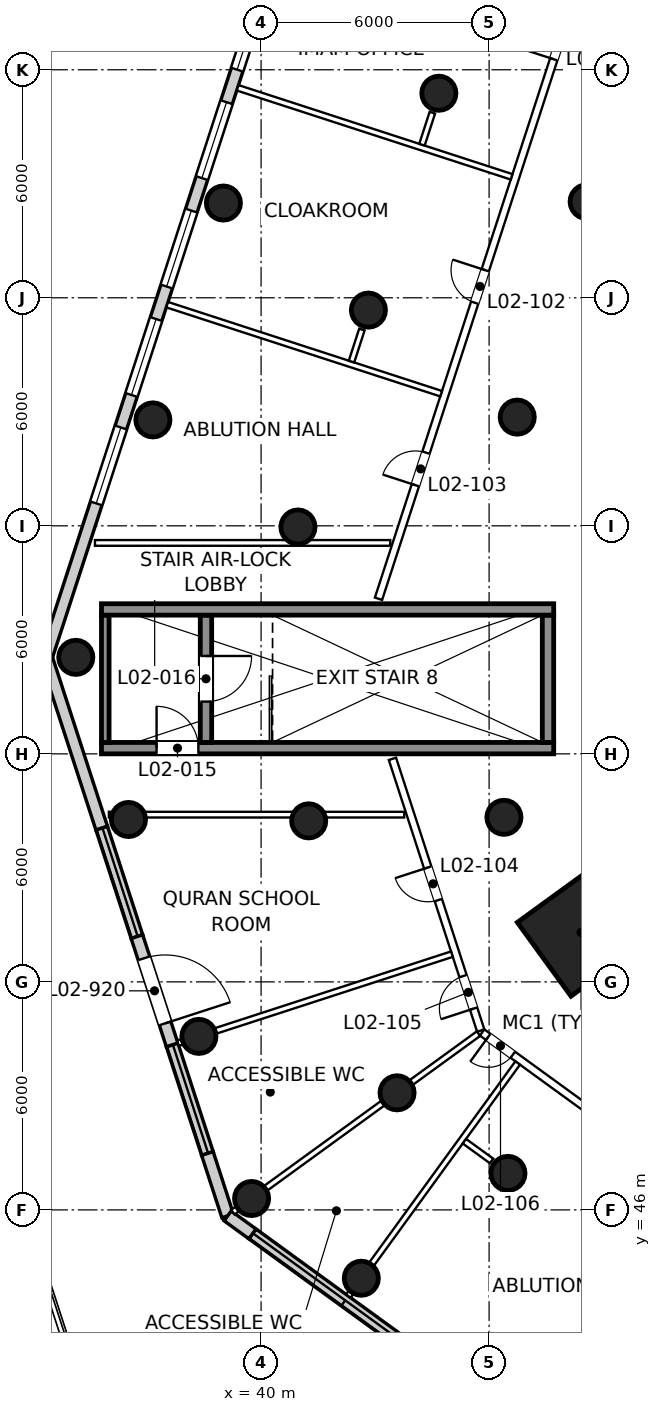
"""IFC4 building model, lengths in metres.
Left out: names, types, materials, properties, quantities, classifications, styles, units other than length and angle.
Written with IfcOpenShell. Run it as: python <this file> out.ifc"""

import sys

from ifc_helpers import new_model, si_unit, direction, frame, frame_2d, origin, origin_2d, place, context, subcontext, project, spatial, rectangle, circle, extrude, element, fill, save


model = new_model("IFC4")
c1 = context("Model", 3, precision=1e-05, world=origin(), true_north=direction((0.0, 1.0)))
c2 = subcontext(c1, "Body", "Model", "MODEL_VIEW")
j1 = project(units=[si_unit("LENGTHUNIT", "METRE"), si_unit("PLANEANGLEUNIT", "RADIAN")], contexts=[c1])
p1 = place(None, origin())
s1 = spatial("IfcSite", under=j1, at=p1, CompositionType="ELEMENT")
p2 = place(p1, origin())
s2 = spatial("IfcBuilding", under=s1, at=p2, CompositionType="ELEMENT")
p3 = place(p2, frame((0.0, 0.0, 15.0)))
s3 = spatial("IfcBuildingStorey", under=s2, at=p3, CompositionType="ELEMENT", Elevation=15.0)
p4 = place(p3, frame((46.39, 56.33, 0.0), z_axis=(0.0, 0.0, 1.0), x_axis=(1.0, 0.0, 0.0)))
e1 = element("IfcColumn", 1, at=p4, inside=s3, PredefinedType="COLUMN", context=c2, shape_type="SweptSolid", body=[
    extrude(circle(Radius=0.45, at=origin_2d()), origin(), (0.0, 0.0, 1.0), 8.0),
])
p5 = place(p3, frame((48.42, 53.3, 0.0), z_axis=(0.0, 0.0, 1.0), x_axis=(-0.809016994375, -0.587785252292, 0.0)))
e2 = element("IfcColumn", 2, at=p5, inside=s3, PredefinedType="COLUMN", context=c2, shape_type="SweptSolid", body=[
    extrude(rectangle(XDim=2.4, YDim=2.4, at=origin_2d()), origin(), (0.0, 0.0, 1.0), 8.0),
])
for number, where, z_axis, x_axis in (
    (3, (48.58, 72.53, 0.0), (0.0, 0.0, 1.0), (1.0, 0.0, 0.0)),
    (4, (46.74, 66.86, 0.0), (0.0, 0.0, 1.0), (1.0, 0.0, 0.0)),
    (5, (35.124, 60.539, 0.0), (0.0, 0.0, 1.0), (1.0, 0.0, 0.0)),
    (6, (36.51, 56.273, 0.0), (0.0, 0.0, 1.0), (1.0, 0.0, 0.0)),
    (7, (38.364, 50.566, 0.0), (0.0, 0.0, 1.0), (1.0, 0.0, 0.0)),
    (8, (39.75, 46.3, 0.0), (0.0, 0.0, 1.0), (1.0, 0.0, 0.0)),
    (9, (42.637, 44.202, 0.0), (0.0, 0.0, 1.0), (1.0, 0.0, 0.0)),
    (10, (39.008, 72.493, 0.0), (0.0, 0.0, 1.0), (1.0, 0.0, 0.0)),
    (11, (37.153, 66.787, 0.0), (0.0, 0.0, 1.0), (1.0, 0.0, 0.0)),
    (12, (41.253, 56.237, 0.0), (0.0, 0.0, 1.0), (1.0, 0.0, 0.0)),
    (13, (43.578, 49.081, 0.0), (0.0, 0.0, 1.0), (1.0, 0.0, 0.0)),
    (14, (46.496, 46.961, 0.0), (0.0, 0.0, 1.0), (1.0, 0.0, 0.0)),
    (15, (44.678, 75.382, 0.0), (0.0, 0.0, 1.0), (1.0, 0.0, 0.0)),
    (16, (42.824, 69.676, 0.0), (0.0, 0.0, 1.0), (1.0, 0.0, 0.0)),
    (17, (40.97, 63.969, 0.0), (0.0, 0.0, 1.0), (1.0, 0.0, 0.0)),
):
    element("IfcColumn", number, at=place(p3, frame(where, z_axis=z_axis, x_axis=x_axis)), inside=s3, PredefinedType="COLUMN", context=c2, shape_type="SweptSolid", body=[
        extrude(circle(Radius=0.45, at=origin_2d()), origin(), (0.0, 0.0, 1.0), 8.0),
    ])
p6 = place(p3, frame((34.345, 60.539, 0.0), z_axis=(0.0, 0.0, 1.0), x_axis=(0.309012484204, -0.951057981727, 0.0)))
e18 = element("IfcWall", 18, at=p6, inside=s3, PredefinedType="SOLIDWALL", context=c2, shape_type="SweptSolid", body=[
    extrude(rectangle(XDim=4.726, YDim=0.32, at=frame_2d((2.363, 0.0))), origin(), (0.0, 0.0, 1.0), 7.65),
])
p7 = place(p3, frame((35.806, 56.044, 0.0), z_axis=(0.0, 0.0, 1.0), x_axis=(0.309065831784, -0.951040646673, 0.0)))
e19 = element("IfcWall", 19, at=p7, inside=s3, PredefinedType="SOLIDWALL", context=c2, shape_type="SweptSolid", body=[
    extrude(rectangle(XDim=3.0, YDim=0.32, at=frame_2d((1.5, 0.0))), origin(), (0.0, 0.0, 1.0), 2.5),
])
p8 = place(p3, frame((36.733, 53.191, 0.0), z_axis=(0.0, 0.0, 1.0), x_axis=(0.308992226232, -0.951064563596, 0.0)))
e20 = element("IfcWall", 20, at=p8, inside=s3, PredefinedType="SOLIDWALL", context=c2, shape_type="SweptSolid", body=[
    extrude(rectangle(XDim=3.0, YDim=0.32, at=frame_2d((1.5, 0.0))), origin(), (0.0, 0.0, 1.0), 7.65),
])
p9 = place(p8, frame((0.6, 0.0, 0.0)))
e21 = element("IfcOpeningElement", 21, at=p9, cuts=e20, PredefinedType="OPENING", context=c2, shape_type="SweptSolid", body=[
    extrude(rectangle(XDim=1.8, YDim=2.4, at=frame_2d((0.9, 1.2))), frame((0.0, 0.17, 0.0), z_axis=(0.0, -1.0, 0.0), x_axis=(1.0, 0.0, 0.0)), (0.0, 0.0, 1.0), 0.34),
])
p10 = place(p3, frame((37.66, 50.338, 0.0), z_axis=(0.0, 0.0, 1.0), x_axis=(0.309016142662, -0.951056793033, 0.0)))
e22 = element("IfcWall", 22, at=p10, inside=s3, PredefinedType="SOLIDWALL", context=c2, shape_type="SweptSolid", body=[
    extrude(rectangle(XDim=3.0, YDim=0.32, at=frame_2d((1.5, 0.0))), origin(), (0.0, 0.0, 1.0), 2.5),
])
p11 = place(p3, frame((38.587, 47.485, 0.0), z_axis=(0.0, 0.0, 1.0), x_axis=(0.309006126888, -0.951060047287, 0.0)))
e23 = element("IfcWall", 23, at=p11, inside=s3, PredefinedType="SOLIDWALL", context=c2, shape_type="SweptSolid", body=[
    extrude(rectangle(XDim=1.726, YDim=0.32, at=frame_2d((0.863, 0.0))), origin(), (0.0, 0.0, 1.0), 7.65),
])
p12 = place(p3, frame((39.121, 45.843, 0.0), z_axis=(0.0, 0.0, 1.0), x_axis=(0.808957761835, -0.587866770252, 0.0)))
e24 = element("IfcWall", 24, at=p12, inside=s3, PredefinedType="SOLIDWALL", context=c2, shape_type="SweptSolid", body=[
    extrude(rectangle(XDim=0.809, YDim=0.32, at=frame_2d((0.405, 0.0))), origin(), (0.0, 0.0, 1.0), 7.65),
])
p13 = place(p3, frame((39.775, 45.367, 0.0), z_axis=(0.0, 0.0, 1.0), x_axis=(0.809016642472, -0.587785736645, 0.0)))
e25 = element("IfcWall", 25, at=p13, inside=s3, PredefinedType="SOLIDWALL", context=c2, shape_type="SweptSolid", body=[
    extrude(rectangle(XDim=12.0, YDim=0.32, at=frame_2d((6.0, 0.0))), origin(), (0.0, 0.0, 1.0), 2.5),
])
p14 = place(p3, frame((42.288, 84.985, 0.0), z_axis=(0.0, 0.0, 1.0), x_axis=(-0.309017988697, -0.95105619322, 0.0)))
e26 = element("IfcWall", 26, at=p14, inside=s3, PredefinedType="SOLIDWALL", context=c2, shape_type="SweptSolid", body=[
    extrude(rectangle(XDim=25.704, YDim=0.32, at=frame_2d((12.852, 0.0))), origin(), (0.0, 0.0, 1.0), 7.65),
])
p15 = place(p14, frame((7.344, 0.0, 0.9)))
e27 = element("IfcOpeningElement", 27, at=p15, cuts=e26, PredefinedType="OPENING", context=c2, shape_type="SweptSolid", body=[
    extrude(rectangle(XDim=2.1, YDim=3.0, at=frame_2d((1.05, 1.5))), frame((0.0, 0.17, 0.0), z_axis=(0.0, -1.0, 0.0), x_axis=(1.0, 0.0, 0.0)), (0.0, 0.0, 1.0), 0.34),
])
p16 = place(p14, frame((10.344, 0.0, 0.9)))
e28 = element("IfcOpeningElement", 28, at=p16, cuts=e26, PredefinedType="OPENING", context=c2, shape_type="SweptSolid", body=[
    extrude(rectangle(XDim=2.1, YDim=3.0, at=frame_2d((1.05, 1.5))), frame((0.0, 0.17, 0.0), z_axis=(0.0, -1.0, 0.0), x_axis=(1.0, 0.0, 0.0)), (0.0, 0.0, 1.0), 0.34),
])
p17 = place(p14, frame((13.344, 0.0, 0.9)))
e29 = element("IfcOpeningElement", 29, at=p17, cuts=e26, PredefinedType="OPENING", context=c2, shape_type="SweptSolid", body=[
    extrude(rectangle(XDim=2.1, YDim=3.0, at=frame_2d((1.05, 1.5))), frame((0.0, 0.17, 0.0), z_axis=(0.0, -1.0, 0.0), x_axis=(1.0, 0.0, 0.0)), (0.0, 0.0, 1.0), 0.34),
])
p18 = place(p14, frame((16.344, 0.0, 0.9)))
e30 = element("IfcOpeningElement", 30, at=p18, cuts=e26, PredefinedType="OPENING", context=c2, shape_type="SweptSolid", body=[
    extrude(rectangle(XDim=2.1, YDim=3.0, at=frame_2d((1.05, 1.5))), frame((0.0, 0.17, 0.0), z_axis=(0.0, -1.0, 0.0), x_axis=(1.0, 0.0, 0.0)), (0.0, 0.0, 1.0), 0.34),
])
p19 = place(p14, frame((19.344, 0.0, 0.9)))
e31 = element("IfcOpeningElement", 31, at=p19, cuts=e26, PredefinedType="OPENING", context=c2, shape_type="SweptSolid", body=[
    extrude(rectangle(XDim=2.1, YDim=3.0, at=frame_2d((1.05, 1.5))), frame((0.0, 0.17, 0.0), z_axis=(0.0, -1.0, 0.0), x_axis=(1.0, 0.0, 0.0)), (0.0, 0.0, 1.0), 0.34),
])
p20 = place(p3, frame((35.8, 58.15, 0.0), z_axis=(0.0, 0.0, 1.0), x_axis=(1.0, 0.0, 0.0)))
e32 = element("IfcWall", 32, at=p20, inside=s3, PredefinedType="SHEAR", context=c2, shape_type="SweptSolid", body=[
    extrude(rectangle(XDim=11.9, YDim=0.3, at=frame_2d((5.95, 0.0))), origin(), (0.0, 0.0, 1.0), 8.0),
])
p21 = place(p20, frame((1.45, 0.0, 0.0)))
e33 = element("IfcOpeningElement", 33, at=p21, cuts=e32, PredefinedType="OPENING", context=c2, shape_type="SweptSolid", body=[
    extrude(rectangle(XDim=1.1, YDim=2.1, at=frame_2d((0.55, 1.05))), frame((0.0, 0.16, 0.0), z_axis=(0.0, -1.0, 0.0), x_axis=(1.0, 0.0, 0.0)), (0.0, 0.0, 1.0), 0.32),
])
p22 = place(p3, frame((35.9, 58.3, 0.0), z_axis=(0.0, 0.0, 1.0), x_axis=(0.0, 1.0, 0.0)))
e34 = element("IfcWall", 34, at=p22, inside=s3, PredefinedType="SHEAR", context=c2, shape_type="SweptSolid", body=[
    extrude(rectangle(XDim=3.35, YDim=0.2, at=frame_2d((1.675, 0.0))), origin(), (0.0, 0.0, 1.0), 8.0),
])
p23 = place(p3, frame((38.55, 58.3, 0.0), z_axis=(0.0, 0.0, 1.0), x_axis=(0.0, 1.0, 0.0)))
e35 = element("IfcWall", 35, at=p23, inside=s3, PredefinedType="SHEAR", context=c2, shape_type="SweptSolid", body=[
    extrude(rectangle(XDim=3.35, YDim=0.3, at=frame_2d((1.675, 0.0))), origin(), (0.0, 0.0, 1.0), 8.0),
])
p24 = place(p23, frame((1.075, 0.0, 0.0)))
e36 = element("IfcOpeningElement", 36, at=p24, cuts=e35, PredefinedType="OPENING", context=c2, shape_type="SweptSolid", body=[
    extrude(rectangle(XDim=1.2, YDim=2.1, at=frame_2d((0.6, 1.05))), frame((0.0, 0.16, 0.0), z_axis=(0.0, -1.0, 0.0), x_axis=(1.0, 0.0, 0.0)), (0.0, 0.0, 1.0), 0.32),
])
p25 = place(p3, frame((47.55, 58.3, 0.0), z_axis=(0.0, 0.0, 1.0), x_axis=(0.0, 1.0, 0.0)))
e37 = element("IfcWall", 37, at=p25, inside=s3, PredefinedType="SHEAR", context=c2, shape_type="SweptSolid", body=[
    extrude(rectangle(XDim=3.35, YDim=0.3, at=frame_2d((1.675, 0.0))), origin(), (0.0, 0.0, 1.0), 8.0),
])
p26 = place(p3, frame((35.8, 61.8, 0.0), z_axis=(0.0, 0.0, 1.0), x_axis=(1.0, 0.0, 0.0)))
e38 = element("IfcWall", 38, at=p26, inside=s3, PredefinedType="SHEAR", context=c2, shape_type="SweptSolid", body=[
    extrude(rectangle(XDim=11.9, YDim=0.3, at=frame_2d((5.95, 0.0))), origin(), (0.0, 0.0, 1.0), 8.0),
])
p27 = place(p3, frame((54.841, 44.112, 0.0), z_axis=(0.0, 0.0, 1.0), x_axis=(-0.809025571226, 0.587773447089, 0.0)))
e39 = element("IfcWall", 39, at=p27, inside=s3, PredefinedType="PARTITIONING", context=c2, shape_type="SweptSolid", body=[
    extrude(rectangle(XDim=11.156, YDim=0.2, at=frame_2d((5.578, 0.0))), origin(), (0.0, 0.0, 1.0), 7.65),
])
p28 = place(p27, frame((10.157, 0.0, 0.0)))
e40 = element("IfcOpeningElement", 40, at=p28, cuts=e39, PredefinedType="OPENING", context=c2, shape_type="SweptSolid", body=[
    extrude(rectangle(XDim=0.8, YDim=2.1, at=frame_2d((0.4, 1.05))), frame((0.0, 0.11, 0.0), z_axis=(0.0, -1.0, 0.0), x_axis=(1.0, 0.0, 0.0)), (0.0, 0.0, 1.0), 0.22),
])
p29 = place(p27, frame((5.404, 0.0, 0.0)))
e41 = element("IfcOpeningElement", 41, at=p29, cuts=e39, PredefinedType="OPENING", context=c2, shape_type="SweptSolid", body=[
    extrude(rectangle(XDim=0.9, YDim=2.1, at=frame_2d((0.45, 1.05))), frame((0.0, 0.11, 0.0), z_axis=(0.0, -1.0, 0.0), x_axis=(1.0, 0.0, 0.0)), (0.0, 0.0, 1.0), 0.22),
])
p30 = place(p3, frame((45.78, 50.719, 0.0), z_axis=(0.0, 0.0, 1.0), x_axis=(-0.309019251854, 0.951055782793, 0.0)))
e42 = element("IfcWall", 42, at=p30, inside=s3, PredefinedType="PARTITIONING", context=c2, shape_type="SweptSolid", body=[
    extrude(rectangle(XDim=7.518, YDim=0.2, at=frame_2d((3.759, 0.0))), origin(), (0.0, 0.0, 1.0), 7.65),
])
p31 = place(p30, frame((3.61, 0.0, 0.0)))
e43 = element("IfcOpeningElement", 43, at=p31, cuts=e42, PredefinedType="OPENING", context=c2, shape_type="SweptSolid", body=[
    extrude(rectangle(XDim=0.9, YDim=2.1, at=frame_2d((0.45, 1.05))), frame((0.0, 0.11, 0.0), z_axis=(0.0, -1.0, 0.0), x_axis=(1.0, 0.0, 0.0)), (0.0, 0.0, 1.0), 0.22),
])
p32 = place(p30, frame((0.607, 0.0, 0.0)))
e44 = element("IfcOpeningElement", 44, at=p32, cuts=e42, PredefinedType="OPENING", context=c2, shape_type="SweptSolid", body=[
    extrude(rectangle(XDim=0.9, YDim=2.1, at=frame_2d((0.45, 1.05))), frame((0.0, 0.11, 0.0), z_axis=(0.0, -1.0, 0.0), x_axis=(1.0, 0.0, 0.0)), (0.0, 0.0, 1.0), 0.22),
])
p33 = place(p3, frame((43.09, 62.081, 0.0), z_axis=(0.0, 0.0, 1.0), x_axis=(0.309014892187, 0.951057199335, 0.0)))
e45 = element("IfcWall", 45, at=p33, inside=s3, PredefinedType="PARTITIONING", context=c2, shape_type="SweptSolid", body=[
    extrude(rectangle(XDim=18.769, YDim=0.2, at=frame_2d((9.384, 0.0))), origin(), (0.0, 0.0, 1.0), 7.65),
])
p34 = place(p33, frame((14.926, 0.0, 0.0)))
e46 = element("IfcOpeningElement", 46, at=p34, cuts=e45, PredefinedType="OPENING", context=c2, shape_type="SweptSolid", body=[
    extrude(rectangle(XDim=0.9, YDim=2.1, at=frame_2d((0.45, 1.05))), frame((0.0, 0.11, 0.0), z_axis=(0.0, -1.0, 0.0), x_axis=(1.0, 0.0, 0.0)), (0.0, 0.0, 1.0), 0.22),
])
p35 = place(p33, frame((8.191, 0.0, 0.0)))
e47 = element("IfcOpeningElement", 47, at=p35, cuts=e45, PredefinedType="OPENING", context=c2, shape_type="SweptSolid", body=[
    extrude(rectangle(XDim=0.9, YDim=2.1, at=frame_2d((0.45, 1.05))), frame((0.0, 0.11, 0.0), z_axis=(0.0, -1.0, 0.0), x_axis=(1.0, 0.0, 0.0)), (0.0, 0.0, 1.0), 0.22),
])
p36 = place(p33, frame((3.143, 0.0, 0.0)))
e48 = element("IfcOpeningElement", 48, at=p36, cuts=e45, PredefinedType="OPENING", context=c2, shape_type="SweptSolid", body=[
    extrude(rectangle(XDim=0.9, YDim=2.1, at=frame_2d((0.45, 1.05))), frame((0.0, 0.11, 0.0), z_axis=(0.0, -1.0, 0.0), x_axis=(1.0, 0.0, 0.0)), (0.0, 0.0, 1.0), 0.22),
])
p37 = place(p3, frame((39.257, 45.942, 0.0), z_axis=(0.0, 0.0, 1.0), x_axis=(0.80901214883, 0.587791921556, 0.0)))
e49 = element("IfcWall", 49, at=p37, inside=s3, PredefinedType="PARTITIONING", context=c2, shape_type="SweptSolid", body=[
    extrude(rectangle(XDim=7.99, YDim=0.15, at=frame_2d((3.995, 0.0))), origin(), (0.0, 0.0, 1.0), 7.65),
])
for number, where, z_axis, x_axis in (
    (50, (39.383, 75.525, 0.0), (0.0, 0.0, 1.0), (0.951, -0.309, 0.0)),
    (51, (37.529, 69.819, 0.0), (0.0, 0.0, 1.0), (0.951, -0.309, 0.0)),
    (52, (37.812, 50.387, 0.0), (0.0, 0.0, 1.0), (0.951, 0.309, 0.0)),
    (53, (42.296, 43.733, 0.0), (0.0, 0.0, 1.0), (0.588, 0.809, 0.0)),
):
    element("IfcWall", number, at=place(p3, frame(where, z_axis=z_axis, x_axis=x_axis)), inside=s3, PredefinedType="PARTITIONING", context=c2, shape_type="SweptSolid", body=[
        extrude(rectangle(XDim=7.58, YDim=0.15, at=frame_2d((3.79, 0.0))), origin(), (0.0, 0.0, 1.0), 6.95),
    ])
p38 = place(p3, frame((46.066, 47.288, 0.0), z_axis=(0.0, 0.0, 1.0), x_axis=(-0.809105603792, 0.587663272557, 0.0)))
e54 = element("IfcWall", 54, at=p38, inside=s3, PredefinedType="PARTITIONING", context=c2, shape_type="SweptSolid", body=[
    extrude(rectangle(XDim=0.885, YDim=0.15, at=frame_2d((0.443, 0.0))), origin(), (0.0, 0.0, 1.0), 6.95),
])
p39 = place(p3, frame((44.507, 74.87, 0.0), z_axis=(0.0, 0.0, 1.0), x_axis=(-0.308936377944, -0.951082706384, 0.0)))
e55 = element("IfcWall", 55, at=p39, inside=s3, PredefinedType="PARTITIONING", context=c2, shape_type="SweptSolid", body=[
    extrude(rectangle(XDim=0.885, YDim=0.15, at=frame_2d((0.442, 0.0))), origin(), (0.0, 0.0, 1.0), 6.95),
])
p40 = place(p3, frame((42.653, 69.164, 0.0), z_axis=(0.0, 0.0, 1.0), x_axis=(-0.309104777097, -0.951027989481, 0.0)))
e56 = element("IfcWall", 56, at=p40, inside=s3, PredefinedType="PARTITIONING", context=c2, shape_type="SweptSolid", body=[
    extrude(rectangle(XDim=0.885, YDim=0.15, at=frame_2d((0.443, 0.0))), origin(), (0.0, 0.0, 1.0), 6.95),
])
p41 = place(p3, frame((35.995, 56.4, 0.0), z_axis=(0.0, 0.0, 1.0), x_axis=(1.0, 0.0, 0.0)))
e57 = element("IfcWall", 57, at=p41, inside=s3, PredefinedType="PARTITIONING", context=c2, shape_type="SweptSolid", body=[
    extrude(rectangle(XDim=7.77, YDim=0.15, at=frame_2d((3.885, 0.0))), origin(), (0.0, 0.0, 1.0), 7.65),
])
p42 = place(p3, frame((43.399, 63.55, 0.0), z_axis=(0.0, 0.0, 1.0), x_axis=(-1.0, 0.0, 0.0)))
e58 = element("IfcWall", 58, at=p42, inside=s3, PredefinedType="PARTITIONING", context=c2, shape_type="SweptSolid", body=[
    extrude(rectangle(XDim=7.77, YDim=0.15, at=frame_2d((3.885, 0.0))), origin(), (0.0, 0.0, 1.0), 6.95),
])
p43 = place(p9, origin())
e59 = element("IfcDoor", 59, at=p43, inside=s3, OperationType="DOUBLE_DOOR_DOUBLE_SWING", PredefinedType="DOOR", context=c2, shape_type="SweptSolid", body=[
    extrude(rectangle(XDim=1.8, YDim=2.4, at=frame_2d((0.9, 1.2))), frame((0.0, 0.04, 0.0), z_axis=(0.0, -1.0, 0.0), x_axis=(1.0, 0.0, 0.0)), (0.0, 0.0, 1.0), 0.05),
])
fill(e21, e59)
p44 = place(p15, origin())
e60 = element("IfcWindow", 60, at=p44, inside=s3, PartitioningType="SINGLE_PANEL", PredefinedType="WINDOW", context=c2, shape_type="SweptSolid", body=[
    extrude(rectangle(XDim=2.1, YDim=3.0, at=frame_2d((1.05, 1.5))), frame((0.0, 0.07, 0.0), z_axis=(0.0, -1.0, 0.0), x_axis=(1.0, 0.0, 0.0)), (0.0, 0.0, 1.0), 0.06),
])
fill(e27, e60)
p45 = place(p16, origin())
e61 = element("IfcWindow", 61, at=p45, inside=s3, PartitioningType="SINGLE_PANEL", PredefinedType="WINDOW", context=c2, shape_type="SweptSolid", body=[
    extrude(rectangle(XDim=2.1, YDim=3.0, at=frame_2d((1.05, 1.5))), frame((0.0, 0.07, 0.0), z_axis=(0.0, -1.0, 0.0), x_axis=(1.0, 0.0, 0.0)), (0.0, 0.0, 1.0), 0.06),
])
fill(e28, e61)
p46 = place(p17, origin())
e62 = element("IfcWindow", 62, at=p46, inside=s3, PartitioningType="SINGLE_PANEL", PredefinedType="WINDOW", context=c2, shape_type="SweptSolid", body=[
    extrude(rectangle(XDim=2.1, YDim=3.0, at=frame_2d((1.05, 1.5))), frame((0.0, 0.07, 0.0), z_axis=(0.0, -1.0, 0.0), x_axis=(1.0, 0.0, 0.0)), (0.0, 0.0, 1.0), 0.06),
])
fill(e29, e62)
p47 = place(p18, origin())
e63 = element("IfcWindow", 63, at=p47, inside=s3, PartitioningType="SINGLE_PANEL", PredefinedType="WINDOW", context=c2, shape_type="SweptSolid", body=[
    extrude(rectangle(XDim=2.1, YDim=3.0, at=frame_2d((1.05, 1.5))), frame((0.0, 0.07, 0.0), z_axis=(0.0, -1.0, 0.0), x_axis=(1.0, 0.0, 0.0)), (0.0, 0.0, 1.0), 0.06),
])
fill(e30, e63)
p48 = place(p19, origin())
e64 = element("IfcWindow", 64, at=p48, inside=s3, PartitioningType="SINGLE_PANEL", PredefinedType="WINDOW", context=c2, shape_type="SweptSolid", body=[
    extrude(rectangle(XDim=2.1, YDim=3.0, at=frame_2d((1.05, 1.5))), frame((0.0, 0.07, 0.0), z_axis=(0.0, -1.0, 0.0), x_axis=(1.0, 0.0, 0.0)), (0.0, 0.0, 1.0), 0.06),
])
fill(e31, e64)
p49 = place(p21, origin())
e65 = element("IfcDoor", 65, at=p49, inside=s3, OperationType="SINGLE_SWING_LEFT", PredefinedType="DOOR", context=c2, shape_type="SweptSolid", body=[
    extrude(rectangle(XDim=1.1, YDim=2.1, at=frame_2d((0.55, 1.05))), frame((0.0, 0.025, 0.0), z_axis=(0.0, -1.0, 0.0), x_axis=(1.0, 0.0, 0.0)), (0.0, 0.0, 1.0), 0.05),
])
fill(e33, e65)
p50 = place(p24, frame((1.2, 0.0, 0.0), z_axis=(0.0, 0.0, 1.0), x_axis=(-1.0, 0.0, 0.0)))
e66 = element("IfcDoor", 66, at=p50, inside=s3, OperationType="SINGLE_SWING_LEFT", PredefinedType="DOOR", context=c2, shape_type="SweptSolid", body=[
    extrude(rectangle(XDim=1.2, YDim=2.1, at=frame_2d((0.6, 1.05))), frame((0.0, 0.025, 0.0), z_axis=(0.0, -1.0, 0.0), x_axis=(1.0, 0.0, 0.0)), (0.0, 0.0, 1.0), 0.05),
])
fill(e36, e66)
p51 = place(p34, origin())
e67 = element("IfcDoor", 67, at=p51, inside=s3, OperationType="SINGLE_SWING_LEFT", PredefinedType="DOOR", context=c2, shape_type="SweptSolid", body=[
    extrude(rectangle(XDim=0.9, YDim=2.1, at=frame_2d((0.45, 1.05))), frame((0.0, 0.025, 0.0), z_axis=(0.0, -1.0, 0.0), x_axis=(1.0, 0.0, 0.0)), (0.0, 0.0, 1.0), 0.05),
])
fill(e46, e67)
p52 = place(p35, origin())
e68 = element("IfcDoor", 68, at=p52, inside=s3, OperationType="SINGLE_SWING_RIGHT", PredefinedType="DOOR", context=c2, shape_type="SweptSolid", body=[
    extrude(rectangle(XDim=0.9, YDim=2.1, at=frame_2d((0.45, 1.05))), frame((0.0, 0.025, 0.0), z_axis=(0.0, -1.0, 0.0), x_axis=(1.0, 0.0, 0.0)), (0.0, 0.0, 1.0), 0.05),
])
fill(e47, e68)
p53 = place(p36, origin())
e69 = element("IfcDoor", 69, at=p53, inside=s3, OperationType="SINGLE_SWING_LEFT", PredefinedType="DOOR", context=c2, shape_type="SweptSolid", body=[
    extrude(rectangle(XDim=0.9, YDim=2.1, at=frame_2d((0.45, 1.05))), frame((0.0, 0.025, 0.0), z_axis=(0.0, -1.0, 0.0), x_axis=(1.0, 0.0, 0.0)), (0.0, 0.0, 1.0), 0.05),
])
fill(e48, e69)
p54 = place(p31, origin())
e70 = element("IfcDoor", 70, at=p54, inside=s3, OperationType="SINGLE_SWING_RIGHT", PredefinedType="DOOR", context=c2, shape_type="SweptSolid", body=[
    extrude(rectangle(XDim=0.9, YDim=2.1, at=frame_2d((0.45, 1.05))), frame((0.0, 0.025, 0.0), z_axis=(0.0, -1.0, 0.0), x_axis=(1.0, 0.0, 0.0)), (0.0, 0.0, 1.0), 0.05),
])
fill(e43, e70)
p55 = place(p32, origin())
e71 = element("IfcDoor", 71, at=p55, inside=s3, OperationType="SINGLE_SWING_LEFT", PredefinedType="DOOR", context=c2, shape_type="SweptSolid", body=[
    extrude(rectangle(XDim=0.9, YDim=2.1, at=frame_2d((0.45, 1.05))), frame((0.0, 0.025, 0.0), z_axis=(0.0, -1.0, 0.0), x_axis=(1.0, 0.0, 0.0)), (0.0, 0.0, 1.0), 0.05),
])
fill(e44, e71)
p56 = place(p28, origin())
e72 = element("IfcDoor", 72, at=p56, inside=s3, OperationType="SINGLE_SWING_RIGHT", PredefinedType="DOOR", context=c2, shape_type="SweptSolid", body=[
    extrude(rectangle(XDim=0.8, YDim=2.1, at=frame_2d((0.4, 1.05))), frame((0.0, 0.025, 0.0), z_axis=(0.0, -1.0, 0.0), x_axis=(1.0, 0.0, 0.0)), (0.0, 0.0, 1.0), 0.05),
])
fill(e40, e72)
save(model, sys.argv[1])
